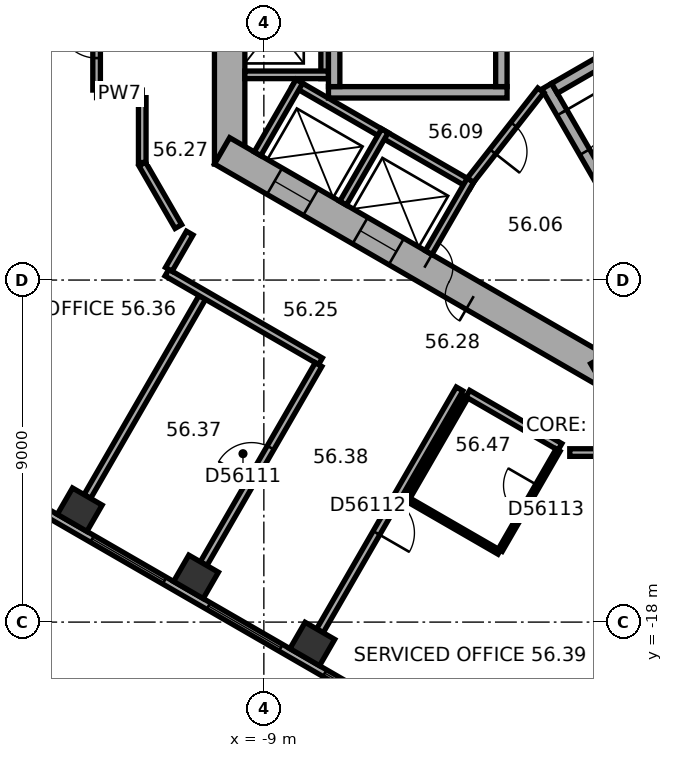
"""IFC4 building model, lengths in metres.
Left out: names, types, materials, properties, quantities, classifications, styles, units other than length and angle.
Written with IfcOpenShell. Run it as: python <this file> out.ifc"""

import sys

from ifc_helpers import new_model, si_unit, direction, frame, frame_2d, origin, origin_2d, place, context, subcontext, project, spatial, rectangle, extrude, element, fill, save


model = new_model("IFC4")
c1 = context("Model", 3, precision=1e-05, world=origin(), true_north=direction((0.0, 1.0)))
c2 = subcontext(c1, "Body", "Model", "MODEL_VIEW")
j1 = project(units=[si_unit("LENGTHUNIT", "METRE"), si_unit("PLANEANGLEUNIT", "RADIAN")], contexts=[c1])
p1 = place(None, origin())
s1 = spatial("IfcSite", under=j1, at=p1, CompositionType="ELEMENT")
p2 = place(p1, origin())
s2 = spatial("IfcBuilding", under=s1, at=p2, CompositionType="ELEMENT")
p3 = place(p2, frame((0.0, 0.0, 229.1)))
s3 = spatial("IfcBuildingStorey", under=s2, at=p3, CompositionType="ELEMENT", Elevation=229.1)
for number, where, z_axis, x_axis in (
    (1, (-13.845, -15.042, 0.0), (0.0, 0.0, 1.0), (0.866, -0.5, 0.0)),
    (2, (-10.785, -16.809, 0.0), (0.0, 0.0, 1.0), (0.866, -0.5, 0.0)),
    (3, (-7.725, -18.576, 0.0), (0.0, 0.0, 1.0), (0.866, -0.5, 0.0)),
):
    element("IfcColumn", number, at=place(p3, frame(where, z_axis=z_axis, x_axis=x_axis)), inside=s3, PredefinedType="COLUMN", context=c2, shape_type="SweptSolid", body=[
        extrude(rectangle(XDim=0.9, YDim=0.8, at=origin_2d()), origin(), (0.0, 0.0, 1.0), 3.7),
    ])
p4 = place(p3, frame((-9.9, 5.947, 0.0), z_axis=(0.0, 0.0, 1.0), x_axis=(0.0, -1.0, 0.0)))
e4 = element("IfcWall", 4, at=p4, inside=s3, PredefinedType="SHEAR", context=c2, shape_type="SweptSolid", body=[
    extrude(rectangle(XDim=11.894, YDim=0.8, at=frame_2d((5.947, 0.0))), origin(), (0.0, 0.0, 1.0), 3.7),
])
p5 = place(p4, frame((5.097, 0.0, 0.0)))
e5 = element("IfcOpeningElement", 5, at=p5, cuts=e4, PredefinedType="OPENING", context=c2, shape_type="SweptSolid", body=[
    extrude(rectangle(XDim=1.1, YDim=2.1, at=frame_2d((0.55, 1.05))), frame((0.0, 0.41, 0.0), z_axis=(0.0, -1.0, 0.0), x_axis=(1.0, 0.0, 0.0)), (0.0, 0.0, 1.0), 0.82),
])
p6 = place(p4, frame((7.697, 0.0, 0.0)))
e6 = element("IfcOpeningElement", 6, at=p6, cuts=e4, PredefinedType="OPENING", context=c2, shape_type="SweptSolid", body=[
    extrude(rectangle(XDim=1.1, YDim=2.1, at=frame_2d((0.55, 1.05))), frame((0.0, 0.41, 0.0), z_axis=(0.0, -1.0, 0.0), x_axis=(1.0, 0.0, 0.0)), (0.0, 0.0, 1.0), 0.82),
])
p7 = place(p3, frame((-10.1, -5.6, 0.0), z_axis=(0.0, 0.0, 1.0), x_axis=(0.866023897231, -0.500002609418, 0.0)))
e7 = element("IfcWall", 7, at=p7, inside=s3, PredefinedType="SHEAR", context=c2, shape_type="SweptSolid", body=[
    extrude(rectangle(XDim=11.894, YDim=0.8, at=frame_2d((5.947, 0.0))), origin(), (0.0, 0.0, 1.0), 3.7),
])
p8 = place(p7, frame((6.147, 0.0, 0.0)))
e8 = element("IfcOpeningElement", 8, at=p8, cuts=e7, PredefinedType="OPENING", context=c2, shape_type="SweptSolid", body=[
    extrude(rectangle(XDim=1.5, YDim=2.1, at=frame_2d((0.75, 1.05))), frame((0.0, 0.41, 0.0), z_axis=(0.0, -1.0, 0.0), x_axis=(1.0, 0.0, 0.0)), (0.0, 0.0, 1.0), 0.82),
])
p9 = place(p7, frame((1.597, 0.0, 0.0)))
e9 = element("IfcOpeningElement", 9, at=p9, cuts=e7, PredefinedType="OPENING", context=c2, shape_type="SweptSolid", body=[
    extrude(rectangle(XDim=1.1, YDim=2.1, at=frame_2d((0.55, 1.05))), frame((0.0, 0.41, 0.0), z_axis=(0.0, -1.0, 0.0), x_axis=(1.0, 0.0, 0.0)), (0.0, 0.0, 1.0), 0.82),
])
p10 = place(p7, frame((4.197, 0.0, 0.0)))
e10 = element("IfcOpeningElement", 10, at=p10, cuts=e7, PredefinedType="OPENING", context=c2, shape_type="SweptSolid", body=[
    extrude(rectangle(XDim=1.1, YDim=2.1, at=frame_2d((0.55, 1.05))), frame((0.0, 0.41, 0.0), z_axis=(0.0, -1.0, 0.0), x_axis=(1.0, 0.0, 0.0)), (0.0, 0.0, 1.0), 0.82),
])
p11 = place(p3, frame((-0.2, -11.547, 0.0), z_axis=(0.0, 0.0, 1.0), x_axis=(0.866023897231, 0.500002609418, 0.0)))
e11 = element("IfcWall", 11, at=p11, inside=s3, PredefinedType="SHEAR", context=c2, shape_type="SweptSolid", body=[
    extrude(rectangle(XDim=11.894, YDim=0.8, at=frame_2d((5.947, 0.0))), origin(), (0.0, 0.0, 1.0), 3.7),
])
p12 = place(p11, frame((2.497, 0.0, 0.0)))
e12 = element("IfcOpeningElement", 12, at=p12, cuts=e11, PredefinedType="OPENING", context=c2, shape_type="SweptSolid", body=[
    extrude(rectangle(XDim=1.1, YDim=2.1, at=frame_2d((0.55, 1.05))), frame((0.0, 0.41, 0.0), z_axis=(0.0, -1.0, 0.0), x_axis=(1.0, 0.0, 0.0)), (0.0, 0.0, 1.0), 0.82),
])
p13 = place(p11, frame((5.097, 0.0, 0.0)))
e13 = element("IfcOpeningElement", 13, at=p13, cuts=e11, PredefinedType="OPENING", context=c2, shape_type="SweptSolid", body=[
    extrude(rectangle(XDim=1.1, YDim=2.1, at=frame_2d((0.55, 1.05))), frame((0.0, 0.41, 0.0), z_axis=(0.0, -1.0, 0.0), x_axis=(1.0, 0.0, 0.0)), (0.0, 0.0, 1.0), 0.82),
])
p14 = place(p11, frame((7.697, 0.0, 0.0)))
e14 = element("IfcOpeningElement", 14, at=p14, cuts=e11, PredefinedType="OPENING", context=c2, shape_type="SweptSolid", body=[
    extrude(rectangle(XDim=1.1, YDim=2.1, at=frame_2d((0.55, 1.05))), frame((0.0, 0.41, 0.0), z_axis=(0.0, -1.0, 0.0), x_axis=(1.0, 0.0, 0.0)), (0.0, 0.0, 1.0), 0.82),
])
p15 = place(p3, frame((-17.664, -13.415, 0.0), z_axis=(0.0, 0.0, 1.0), x_axis=(0.866026555358, -0.49999800541, 0.0)))
e15 = element("IfcWall", 15, at=p15, inside=s3, PredefinedType="STANDARD", context=c2, shape_type="SweptSolid", body=[
    extrude(rectangle(XDim=18.841, YDim=0.2, at=frame_2d((9.421, 0.0))), origin(), (0.0, 0.0, 1.0), 3.7),
])
p16 = place(p15, frame((1.254, 0.0, 0.9)))
e16 = element("IfcOpeningElement", 16, at=p16, cuts=e15, PredefinedType="OPENING", context=c2, shape_type="SweptSolid", body=[
    extrude(rectangle(XDim=2.2, YDim=2.0, at=frame_2d((1.1, 1.0))), frame((0.0, 0.11, 0.0), z_axis=(0.0, -1.0, 0.0), x_axis=(1.0, 0.0, 0.0)), (0.0, 0.0, 1.0), 0.22),
])
p17 = place(p15, frame((4.788, 0.0, 0.9)))
e17 = element("IfcOpeningElement", 17, at=p17, cuts=e15, PredefinedType="OPENING", context=c2, shape_type="SweptSolid", body=[
    extrude(rectangle(XDim=2.2, YDim=2.0, at=frame_2d((1.1, 1.0))), frame((0.0, 0.11, 0.0), z_axis=(0.0, -1.0, 0.0), x_axis=(1.0, 0.0, 0.0)), (0.0, 0.0, 1.0), 0.22),
])
p18 = place(p15, frame((8.322, 0.0, 0.9)))
e18 = element("IfcOpeningElement", 18, at=p18, cuts=e15, PredefinedType="OPENING", context=c2, shape_type="SweptSolid", body=[
    extrude(rectangle(XDim=2.2, YDim=2.0, at=frame_2d((1.1, 1.0))), frame((0.0, 0.11, 0.0), z_axis=(0.0, -1.0, 0.0), x_axis=(1.0, 0.0, 0.0)), (0.0, 0.0, 1.0), 0.22),
])
p19 = place(p15, frame((11.855, 0.0, 0.9)))
e19 = element("IfcOpeningElement", 19, at=p19, cuts=e15, PredefinedType="OPENING", context=c2, shape_type="SweptSolid", body=[
    extrude(rectangle(XDim=2.2, YDim=2.0, at=frame_2d((1.1, 1.0))), frame((0.0, 0.11, 0.0), z_axis=(0.0, -1.0, 0.0), x_axis=(1.0, 0.0, 0.0)), (0.0, 0.0, 1.0), 0.22),
])
p20 = place(p15, frame((15.389, 0.0, 0.9)))
e20 = element("IfcOpeningElement", 20, at=p20, cuts=e15, PredefinedType="OPENING", context=c2, shape_type="SweptSolid", body=[
    extrude(rectangle(XDim=2.2, YDim=2.0, at=frame_2d((1.1, 1.0))), frame((0.0, 0.11, 0.0), z_axis=(0.0, -1.0, 0.0), x_axis=(1.0, 0.0, 0.0)), (0.0, 0.0, 1.0), 0.22),
])
p21 = place(p3, frame((-7.4, 4.3, 0.0), z_axis=(0.0, 0.0, 1.0), x_axis=(0.0, -1.0, 0.0)))
e21 = element("IfcWall", 21, at=p21, inside=s3, PredefinedType="PARTITIONING", context=c2, shape_type="SweptSolid", body=[
    extrude(rectangle(XDim=8.0, YDim=0.2, at=frame_2d((4.0, 0.0))), origin(), (0.0, 0.0, 1.0), 3.42),
])
p22 = place(p3, frame((-7.3, -3.6, 0.0), z_axis=(0.0, 0.0, 1.0), x_axis=(-1.0, 0.0, 0.0)))
e22 = element("IfcWall", 22, at=p22, inside=s3, PredefinedType="PARTITIONING", context=c2, shape_type="SweptSolid", body=[
    extrude(rectangle(XDim=2.2, YDim=0.2, at=frame_2d((1.1, 0.0))), origin(), (0.0, 0.0, 1.0), 3.42),
])
p23 = place(p3, frame((-8.203, -3.809, 0.0), z_axis=(0.0, 0.0, 1.0), x_axis=(0.866028230842, -0.499995103361, 0.0)))
e23 = element("IfcWall", 23, at=p23, inside=s3, PredefinedType="PARTITIONING", context=c2, shape_type="SweptSolid", body=[
    extrude(rectangle(XDim=5.4, YDim=0.2, at=frame_2d((2.7, 0.0))), origin(), (0.0, 0.0, 1.0), 3.42),
])
for number, where, z_axis, x_axis in (
    (24, (-8.067, -3.772, 0.0), (0.0, 0.0, 1.0), (-0.5, -0.866, 0.0)),
    (25, (-5.815, -5.072, 0.0), (0.0, 0.0, 1.0), (-0.5, -0.866, 0.0)),
):
    element("IfcWall", number, at=place(p3, frame(where, z_axis=z_axis, x_axis=x_axis)), inside=s3, PredefinedType="PARTITIONING", context=c2, shape_type="SweptSolid", body=[
        extrude(rectangle(XDim=2.2, YDim=0.2, at=frame_2d((1.1, 0.0))), origin(), (0.0, 0.0, 1.0), 3.42),
    ])
p24 = place(p3, frame((-3.563, -6.372, 0.0), z_axis=(0.0, 0.0, 1.0), x_axis=(-0.499994660107, -0.866028486751, 0.0)))
e26 = element("IfcWall", 26, at=p24, inside=s3, PredefinedType="PARTITIONING", context=c2, shape_type="SweptSolid", body=[
    extrude(rectangle(XDim=2.2, YDim=0.2, at=frame_2d((1.1, 0.0))), origin(), (0.0, 0.0, 1.0), 3.42),
])
p25 = place(p3, frame((-2.6, -4.06, 0.0), z_axis=(0.0, 0.0, 1.0), x_axis=(-1.0, 0.0, 0.0)))
e27 = element("IfcWall", 27, at=p25, inside=s3, PredefinedType="SHEAR", context=c2, shape_type="SweptSolid", body=[
    extrude(rectangle(XDim=4.7, YDim=0.3, at=frame_2d((2.35, 0.0))), origin(), (0.0, 0.0, 1.0), 3.42),
])
for number, where, z_axis, x_axis in (
    (28, (-2.75, 3.15, 0.0), (0.0, 0.0, 1.0), (0.0, -1.0, 0.0)),
    (29, (-7.15, 3.15, 0.0), (0.0, 0.0, 1.0), (0.0, -1.0, 0.0)),
):
    element("IfcWall", number, at=place(p3, frame(where, z_axis=z_axis, x_axis=x_axis)), inside=s3, PredefinedType="SHEAR", context=c2, shape_type="SweptSolid", body=[
        extrude(rectangle(XDim=7.06, YDim=0.3, at=frame_2d((3.53, 0.0))), origin(), (0.0, 0.0, 1.0), 3.42),
    ])
p26 = place(p3, frame((-1.558, -3.902, 0.0), z_axis=(0.0, 0.0, 1.0), x_axis=(0.499977259774, -0.866038532462, 0.0)))
e30 = element("IfcWall", 30, at=p26, inside=s3, PredefinedType="SHEAR", context=c2, shape_type="SweptSolid", body=[
    extrude(rectangle(XDim=4.7, YDim=0.3, at=frame_2d((2.35, 0.0))), origin(), (0.0, 0.0, 1.0), 3.42),
])
p27 = place(p26, frame((0.8, 0.0, 0.0)))
e31 = element("IfcOpeningElement", 31, at=p27, cuts=e30, PredefinedType="OPENING", context=c2, shape_type="SweptSolid", body=[
    extrude(rectangle(XDim=1.2, YDim=2.1, at=frame_2d((0.6, 1.05))), frame((0.0, 0.16, 0.0), z_axis=(0.0, -1.0, 0.0), x_axis=(1.0, 0.0, 0.0)), (0.0, 0.0, 1.0), 0.32),
])
p28 = place(p3, frame((-1.353, -3.957, 0.0), z_axis=(0.0, 0.0, 1.0), x_axis=(0.866027801685, 0.499995846692, 0.0)))
e32 = element("IfcWall", 32, at=p28, inside=s3, PredefinedType="SHEAR", context=c2, shape_type="SweptSolid", body=[
    extrude(rectangle(XDim=7.06, YDim=0.3, at=frame_2d((3.53, 0.0))), origin(), (0.0, 0.0, 1.0), 3.42),
])
p29 = place(p3, frame((-1.712, -4.008, 0.0), z_axis=(0.0, 0.0, 1.0), x_axis=(-0.616549420702, -0.787316208287, 0.0)))
e33 = element("IfcWall", 33, at=p29, inside=s3, PredefinedType="PARTITIONING", context=c2, shape_type="SweptSolid", body=[
    extrude(rectangle(XDim=3.002, YDim=0.2, at=frame_2d((1.501, 0.0))), origin(), (0.0, 0.0, 1.0), 3.42),
])
p30 = place(p29, frame((1.15, 0.0, 0.0)))
e34 = element("IfcOpeningElement", 34, at=p30, cuts=e33, PredefinedType="OPENING", context=c2, shape_type="SweptSolid", body=[
    extrude(rectangle(XDim=0.9, YDim=2.1, at=frame_2d((0.45, 1.05))), frame((0.0, 0.11, 0.0), z_axis=(0.0, -1.0, 0.0), x_axis=(1.0, 0.0, 0.0)), (0.0, 0.0, 1.0), 0.22),
])
p31 = place(p3, frame((-13.646, -14.696, 0.0), z_axis=(0.0, 0.0, 1.0), x_axis=(0.500006596359, 0.866021595341, 0.0)))
e35 = element("IfcWall", 35, at=p31, inside=s3, PredefinedType="PARTITIONING", context=c2, shape_type="SweptSolid", body=[
    extrude(rectangle(XDim=6.049, YDim=0.2, at=frame_2d((3.025, 0.0))), origin(), (0.0, 0.0, 1.0), 3.42),
])
p32 = place(p3, frame((-13.401, -4.101, 0.0), z_axis=(0.0, 0.0, 1.0), x_axis=(1.0, 0.0, 0.0)))
e36 = element("IfcWall", 36, at=p32, inside=s3, PredefinedType="PARTITIONING", context=c2, shape_type="SweptSolid", body=[
    extrude(rectangle(XDim=1.201, YDim=0.2, at=frame_2d((0.601, 0.0))), origin(), (0.0, 0.0, 1.0), 3.42),
])
p33 = place(p3, frame((-13.401, 1.533, 0.0), z_axis=(0.0, 0.0, 1.0), x_axis=(0.0, -1.0, 0.0)))
e37 = element("IfcWall", 37, at=p33, inside=s3, PredefinedType="PARTITIONING", context=c2, shape_type="SweptSolid", body=[
    extrude(rectangle(XDim=5.534, YDim=0.2, at=frame_2d((2.767, 0.0))), origin(), (0.0, 0.0, 1.0), 3.42),
])
p34 = place(p33, frame((3.692, 0.0, 0.0)))
e38 = element("IfcOpeningElement", 38, at=p34, cuts=e37, PredefinedType="OPENING", context=c2, shape_type="SweptSolid", body=[
    extrude(rectangle(XDim=1.0, YDim=2.1, at=frame_2d((0.5, 1.05))), frame((0.0, 0.11, 0.0), z_axis=(0.0, -1.0, 0.0), x_axis=(1.0, 0.0, 0.0)), (0.0, 0.0, 1.0), 0.22),
])
p35 = place(p3, frame((-12.2, -5.947, 0.0), z_axis=(0.0, 0.0, 1.0), x_axis=(0.500022797313, -0.86601224135, 0.0)))
e39 = element("IfcWall", 39, at=p35, inside=s3, PredefinedType="PARTITIONING", context=c2, shape_type="SweptSolid", body=[
    extrude(rectangle(XDim=1.9, YDim=0.2, at=frame_2d((0.95, 0.0))), origin(), (0.0, 0.0, 1.0), 3.42),
])
p36 = place(p3, frame((-12.2, -4.201, 0.0), z_axis=(0.0, 0.0, 1.0), x_axis=(0.0, -1.0, 0.0)))
e40 = element("IfcWall", 40, at=p36, inside=s3, PredefinedType="PARTITIONING", context=c2, shape_type="SweptSolid", body=[
    extrude(rectangle(XDim=1.706, YDim=0.2, at=frame_2d((0.853, 0.0))), origin(), (0.0, 0.0, 1.0), 3.42),
])
p37 = place(p3, frame((-11.551, -8.805, 0.0), z_axis=(0.0, 0.0, 1.0), x_axis=(0.866038310922, -0.499977643516, 0.0)))
e41 = element("IfcWall", 41, at=p37, inside=s3, PredefinedType="PARTITIONING", context=c2, shape_type="SweptSolid", body=[
    extrude(rectangle(XDim=4.665, YDim=0.2, at=frame_2d((2.333, 0.0))), origin(), (0.0, 0.0, 1.0), 3.42),
])
p38 = place(p3, frame((-10.951, -7.765, 0.0), z_axis=(0.0, 0.0, 1.0), x_axis=(-0.499978356969, -0.866037899034, 0.0)))
e42 = element("IfcWall", 42, at=p38, inside=s3, PredefinedType="PARTITIONING", context=c2, shape_type="SweptSolid", body=[
    extrude(rectangle(XDim=1.101, YDim=0.2, at=frame_2d((0.551, 0.0))), origin(), (0.0, 0.0, 1.0), 3.42),
])
p39 = place(p3, frame((-10.585, -16.463, 0.0), z_axis=(0.0, 0.0, 1.0), x_axis=(0.499993802756, 0.866028981735, 0.0)))
e43 = element("IfcWall", 43, at=p39, inside=s3, PredefinedType="PARTITIONING", context=c2, shape_type="SweptSolid", body=[
    extrude(rectangle(XDim=6.049, YDim=0.2, at=frame_2d((3.024, 0.0))), origin(), (0.0, 0.0, 1.0), 2.87),
])
p40 = place(p39, frame((2.524, 0.0, 0.0)))
e44 = element("IfcOpeningElement", 44, at=p40, cuts=e43, PredefinedType="OPENING", context=c2, shape_type="SweptSolid", body=[
    extrude(rectangle(XDim=1.0, YDim=2.1, at=frame_2d((0.5, 1.05))), frame((0.0, 0.11, 0.0), z_axis=(0.0, -1.0, 0.0), x_axis=(1.0, 0.0, 0.0)), (0.0, 0.0, 1.0), 0.22),
])
p41 = place(p3, frame((-7.525, -18.23, 0.0), z_axis=(0.0, 0.0, 1.0), x_axis=(0.499983153418, 0.866035129944, 0.0)))
e45 = element("IfcWall", 45, at=p41, inside=s3, PredefinedType="PARTITIONING", context=c2, shape_type="SweptSolid", body=[
    extrude(rectangle(XDim=7.35, YDim=0.2, at=frame_2d((3.675, 0.0))), origin(), (0.0, 0.0, 1.0), 3.42),
])
p42 = place(p41, frame((2.975, 0.0, 0.0)))
e46 = element("IfcOpeningElement", 46, at=p42, cuts=e45, PredefinedType="OPENING", context=c2, shape_type="SweptSolid", body=[
    extrude(rectangle(XDim=1.0, YDim=2.1, at=frame_2d((0.5, 1.05))), frame((0.0, 0.11, 0.0), z_axis=(0.0, -1.0, 0.0), x_axis=(1.0, 0.0, 0.0)), (0.0, 0.0, 1.0), 0.22),
])
p43 = place(p3, frame((-5.233, -14.761, 0.0), z_axis=(0.0, 0.0, 1.0), x_axis=(0.499967891604, 0.866043940782, 0.0)))
e47 = element("IfcWall", 47, at=p43, inside=s3, PredefinedType="PARTITIONING", context=c2, shape_type="SweptSolid", body=[
    extrude(rectangle(XDim=3.1, YDim=0.12, at=frame_2d((1.55, 0.0))), origin(), (0.0, 0.0, 1.0), 3.42),
])
p44 = place(p3, frame((-3.634, -11.99, 0.0), z_axis=(0.0, 0.0, 1.0), x_axis=(0.866018616679, -0.500011755427, 0.0)))
e48 = element("IfcWall", 48, at=p44, inside=s3, PredefinedType="PARTITIONING", context=c2, shape_type="SweptSolid", body=[
    extrude(rectangle(XDim=2.8, YDim=0.2, at=frame_2d((1.4, 0.0))), origin(), (0.0, 0.0, 1.0), 3.42),
])
p45 = place(p3, frame((-2.809, -16.161, 0.0), z_axis=(0.0, 0.0, 1.0), x_axis=(-0.865997131366, 0.500048966069, 0.0)))
e49 = element("IfcWall", 49, at=p45, inside=s3, PredefinedType="PARTITIONING", context=c2, shape_type="SweptSolid", body=[
    extrude(rectangle(XDim=2.74, YDim=0.12, at=frame_2d((1.37, 0.0))), origin(), (0.0, 0.0, 1.0), 3.42),
])
p46 = place(p3, frame((-1.259, -13.476, 0.0), z_axis=(0.0, 0.0, 1.0), x_axis=(-0.500026023896, -0.86601037836, 0.0)))
e50 = element("IfcWall", 50, at=p46, inside=s3, PredefinedType="PARTITIONING", context=c2, shape_type="SweptSolid", body=[
    extrude(rectangle(XDim=3.04, YDim=0.12, at=frame_2d((1.52, 0.0))), origin(), (0.0, 0.0, 1.0), 3.42),
])
p47 = place(p46, frame((1.07, 0.0, 0.0)))
e51 = element("IfcOpeningElement", 51, at=p47, cuts=e50, PredefinedType="OPENING", context=c2, shape_type="SweptSolid", body=[
    extrude(rectangle(XDim=0.9, YDim=2.1, at=frame_2d((0.45, 1.05))), frame((0.0, 0.07, 0.0), z_axis=(0.0, -1.0, 0.0), x_axis=(1.0, 0.0, 0.0)), (0.0, 0.0, 1.0), 0.14),
])
p48 = place(p3, frame((-0.95, -13.539, 0.0), z_axis=(0.0, 0.0, 1.0), x_axis=(1.0, 0.0, 0.0)))
e52 = element("IfcWall", 52, at=p48, inside=s3, PredefinedType="PARTITIONING", context=c2, shape_type="SweptSolid", body=[
    extrude(rectangle(XDim=1.9, YDim=0.2, at=frame_2d((0.95, 0.0))), origin(), (0.0, 0.0, 1.0), 3.42),
])
p49 = place(p17, origin())
e53 = element("IfcWindow", 53, at=p49, inside=s3, PartitioningType="SINGLE_PANEL", PredefinedType="WINDOW", context=c2, shape_type="SweptSolid", body=[
    extrude(rectangle(XDim=2.2, YDim=2.0, at=frame_2d((1.1, 1.0))), frame((0.0, 0.03, 0.0), z_axis=(0.0, -1.0, 0.0), x_axis=(1.0, 0.0, 0.0)), (0.0, 0.0, 1.0), 0.06),
])
fill(e17, e53)
p50 = place(p18, origin())
e54 = element("IfcWindow", 54, at=p50, inside=s3, PartitioningType="SINGLE_PANEL", PredefinedType="WINDOW", context=c2, shape_type="SweptSolid", body=[
    extrude(rectangle(XDim=2.2, YDim=2.0, at=frame_2d((1.1, 1.0))), frame((0.0, 0.03, 0.0), z_axis=(0.0, -1.0, 0.0), x_axis=(1.0, 0.0, 0.0)), (0.0, 0.0, 1.0), 0.06),
])
fill(e18, e54)
p51 = place(p19, origin())
e55 = element("IfcWindow", 55, at=p51, inside=s3, PartitioningType="SINGLE_PANEL", PredefinedType="WINDOW", context=c2, shape_type="SweptSolid", body=[
    extrude(rectangle(XDim=2.2, YDim=2.0, at=frame_2d((1.1, 1.0))), frame((0.0, 0.03, 0.0), z_axis=(0.0, -1.0, 0.0), x_axis=(1.0, 0.0, 0.0)), (0.0, 0.0, 1.0), 0.06),
])
fill(e19, e55)
p52 = place(p8, origin())
e56 = element("IfcDoor", 56, at=p52, inside=s3, OperationType="DOUBLE_DOOR_SINGLE_SWING", PredefinedType="DOOR", context=c2, shape_type="SweptSolid", body=[
    extrude(rectangle(XDim=1.5, YDim=2.1, at=frame_2d((0.75, 1.05))), frame((0.0, 0.025, 0.0), z_axis=(0.0, -1.0, 0.0), x_axis=(1.0, 0.0, 0.0)), (0.0, 0.0, 1.0), 0.05),
])
fill(e8, e56)
p53 = place(p27, origin())
e57 = element("IfcDoor", 57, at=p53, inside=s3, OperationType="SINGLE_SWING_RIGHT", PredefinedType="DOOR", context=c2, shape_type="SweptSolid", body=[
    extrude(rectangle(XDim=1.2, YDim=2.1, at=frame_2d((0.6, 1.05))), frame((0.0, 0.025, 0.0), z_axis=(0.0, -1.0, 0.0), x_axis=(1.0, 0.0, 0.0)), (0.0, 0.0, 1.0), 0.05),
])
fill(e31, e57)
p54 = place(p30, origin())
e58 = element("IfcDoor", 58, at=p54, inside=s3, OperationType="SINGLE_SWING_LEFT", PredefinedType="DOOR", context=c2, shape_type="SweptSolid", body=[
    extrude(rectangle(XDim=0.9, YDim=2.1, at=frame_2d((0.45, 1.05))), frame((0.0, 0.025, 0.0), z_axis=(0.0, -1.0, 0.0), x_axis=(1.0, 0.0, 0.0)), (0.0, 0.0, 1.0), 0.05),
])
fill(e34, e58)
p55 = place(p9, origin())
e59 = element("IfcDoor", 59, at=p55, inside=s3, OperationType="DOUBLE_DOOR_SLIDING", PredefinedType="DOOR", context=c2, shape_type="SweptSolid", body=[
    extrude(rectangle(XDim=1.1, YDim=2.1, at=frame_2d((0.55, 1.05))), frame((0.0, 0.025, 0.0), z_axis=(0.0, -1.0, 0.0), x_axis=(1.0, 0.0, 0.0)), (0.0, 0.0, 1.0), 0.05),
])
fill(e9, e59)
p56 = place(p10, origin())
e60 = element("IfcDoor", 60, at=p56, inside=s3, OperationType="DOUBLE_DOOR_SLIDING", PredefinedType="DOOR", context=c2, shape_type="SweptSolid", body=[
    extrude(rectangle(XDim=1.1, YDim=2.1, at=frame_2d((0.55, 1.05))), frame((0.0, 0.025, 0.0), z_axis=(0.0, -1.0, 0.0), x_axis=(1.0, 0.0, 0.0)), (0.0, 0.0, 1.0), 0.05),
])
fill(e10, e60)
p57 = place(p34, origin())
e61 = element("IfcDoor", 61, at=p57, inside=s3, OperationType="SINGLE_SWING_LEFT", PredefinedType="DOOR", context=c2, shape_type="SweptSolid", body=[
    extrude(rectangle(XDim=1.0, YDim=2.1, at=frame_2d((0.5, 1.05))), frame((0.0, 0.025, 0.0), z_axis=(0.0, -1.0, 0.0), x_axis=(1.0, 0.0, 0.0)), (0.0, 0.0, 1.0), 0.05),
])
fill(e38, e61)
p58 = place(p40, origin())
e62 = element("IfcDoor", 62, at=p58, inside=s3, OperationType="SINGLE_SWING_LEFT", PredefinedType="DOOR", context=c2, shape_type="SweptSolid", body=[
    extrude(rectangle(XDim=1.0, YDim=2.1, at=frame_2d((0.5, 1.05))), frame((0.0, 0.025, 0.0), z_axis=(0.0, -1.0, 0.0), x_axis=(1.0, 0.0, 0.0)), (0.0, 0.0, 1.0), 0.05),
])
fill(e44, e62)
p59 = place(p42, origin())
e63 = element("IfcDoor", 63, at=p59, inside=s3, OperationType="SINGLE_SWING_LEFT", PredefinedType="DOOR", context=c2, shape_type="SweptSolid", body=[
    extrude(rectangle(XDim=1.0, YDim=2.1, at=frame_2d((0.5, 1.05))), frame((0.0, 0.025, 0.0), z_axis=(0.0, -1.0, 0.0), x_axis=(1.0, 0.0, 0.0)), (0.0, 0.0, 1.0), 0.05),
])
fill(e46, e63)
p60 = place(p47, origin())
e64 = element("IfcDoor", 64, at=p60, inside=s3, OperationType="SINGLE_SWING_LEFT", PredefinedType="DOOR", context=c2, shape_type="SweptSolid", body=[
    extrude(rectangle(XDim=0.9, YDim=2.1, at=frame_2d((0.45, 1.05))), frame((0.0, 0.025, 0.0), z_axis=(0.0, -1.0, 0.0), x_axis=(1.0, 0.0, 0.0)), (0.0, 0.0, 1.0), 0.05),
])
fill(e51, e64)
save(model, sys.argv[1])
